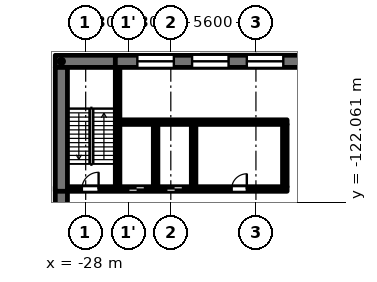
"""IFC4 building model, lengths in metres.
Left out: names, types, materials, properties, quantities, classifications, styles, units other than length and angle.
Written with IfcOpenShell. Run it as: python <this file> out.ifc"""

import sys

from ifc_helpers import new_model, si_unit, direction, frame, frame_2d, origin, place, context, subcontext, project, spatial, rectangle, extrude, element, fill, save


model = new_model("IFC4")
c1 = context("Model", 3, precision=1e-05, world=origin(), true_north=direction((0.0, 1.0)))
c2 = subcontext(c1, "Body", "Model", "MODEL_VIEW")
j1 = project(units=[si_unit("LENGTHUNIT", "METRE"), si_unit("PLANEANGLEUNIT", "RADIAN")], contexts=[c1])
p1 = place(None, origin())
s1 = spatial("IfcSite", under=j1, at=p1, CompositionType="ELEMENT")
p2 = place(p1, origin())
s2 = spatial("IfcBuilding", under=s1, at=p2, CompositionType="ELEMENT")
p3 = place(p2, frame((0.0, 0.0, 6.5)))
s3 = spatial("IfcBuildingStorey", under=s2, at=p3, CompositionType="ELEMENT", Elevation=6.5)
p4 = place(p3, frame((-29.2, -121.2, 0.0), z_axis=(0.0, 0.0, 1.0), x_axis=(1.0, 0.0, 0.0)))
e1 = element("IfcWall", 1, at=p4, inside=s3, PredefinedType="SOLIDWALL", context=c2, shape_type="SweptSolid", body=[
    extrude(rectangle(XDim=14.45, YDim=0.3, at=frame_2d((7.225, 0.0))), origin(), (0.0, 0.0, 1.0), 4.45),
])
p5 = place(p4, frame((4.0, 0.0, 0.0)))
e2 = element("IfcOpeningElement", 2, at=p5, cuts=e1, PredefinedType="OPENING", context=c2, shape_type="SweptSolid", body=[
    extrude(rectangle(XDim=1.1, YDim=2.1, at=frame_2d((0.55, 1.05))), frame((0.0, 0.16, 0.0), z_axis=(0.0, -1.0, 0.0), x_axis=(1.0, 0.0, 0.0)), (0.0, 0.0, 1.0), 0.32),
])
p6 = place(p4, frame((6.5, 0.0, 0.0)))
e3 = element("IfcOpeningElement", 3, at=p6, cuts=e1, PredefinedType="OPENING", context=c2, shape_type="SweptSolid", body=[
    extrude(rectangle(XDim=1.1, YDim=2.1, at=frame_2d((0.55, 1.05))), frame((0.0, 0.16, 0.0), z_axis=(0.0, -1.0, 0.0), x_axis=(1.0, 0.0, 0.0)), (0.0, 0.0, 1.0), 0.32),
])
p7 = place(p4, frame((0.95, 0.0, 0.0)))
e4 = element("IfcOpeningElement", 4, at=p7, cuts=e1, PredefinedType="OPENING", context=c2, shape_type="SweptSolid", body=[
    extrude(rectangle(XDim=1.1, YDim=2.1, at=frame_2d((0.55, 1.05))), frame((0.0, 0.16, 0.0), z_axis=(0.0, -1.0, 0.0), x_axis=(1.0, 0.0, 0.0)), (0.0, 0.0, 1.0), 0.32),
])
p8 = place(p4, frame((10.8, 0.0, 0.0)))
e5 = element("IfcOpeningElement", 5, at=p8, cuts=e1, PredefinedType="OPENING", context=c2, shape_type="SweptSolid", body=[
    extrude(rectangle(XDim=1.0, YDim=2.1, at=frame_2d((0.5, 1.05))), frame((0.0, 0.16, 0.0), z_axis=(0.0, -1.0, 0.0), x_axis=(1.0, 0.0, 0.0)), (0.0, 0.0, 1.0), 0.32),
])
p9 = place(p3, frame((-25.75, -116.8, 0.0), z_axis=(0.0, 0.0, 1.0), x_axis=(1.0, 0.0, 0.0)))
e6 = element("IfcWall", 6, at=p9, inside=s3, PredefinedType="SOLIDWALL", context=c2, shape_type="SweptSolid", body=[
    extrude(rectangle(XDim=11.0, YDim=0.3, at=frame_2d((5.5, 0.0))), origin(), (0.0, 0.0, 1.0), 4.45),
])
p10 = place(p3, frame((-30.0, -112.8, 0.0), z_axis=(0.0, 0.0, 1.0), x_axis=(1.0, 0.0, 0.0)))
e7 = element("IfcWall", 7, at=p10, inside=s3, PredefinedType="SOLIDWALL", context=c2, shape_type="SweptSolid", body=[
    extrude(rectangle(XDim=4.25, YDim=0.8, at=frame_2d((2.125, 0.0))), origin(), (0.0, 0.0, 1.0), 4.45),
])
p11 = place(p3, frame((-26.05, -112.8, 0.0), z_axis=(0.0, 0.0, 1.0), x_axis=(1.0, 0.0, 0.0)))
e8 = element("IfcWall", 8, at=p11, inside=s3, PredefinedType="SOLIDWALL", context=c2, shape_type="SweptSolid", body=[
    extrude(rectangle(XDim=52.1, YDim=0.8, at=frame_2d((26.05, 0.0))), origin(), (0.0, 0.0, 1.0), 4.45),
])
p12 = place(p11, frame((1.45, 0.0, 0.6)))
e9 = element("IfcOpeningElement", 9, at=p12, cuts=e8, PredefinedType="OPENING", context=c2, shape_type="SweptSolid", body=[
    extrude(rectangle(XDim=2.4, YDim=3.2, at=frame_2d((1.2, 1.6))), frame((0.0, 0.41, 0.0), z_axis=(0.0, -1.0, 0.0), x_axis=(1.0, 0.0, 0.0)), (0.0, 0.0, 1.0), 0.82),
])
p13 = place(p11, frame((5.05, 0.0, 0.6)))
e10 = element("IfcOpeningElement", 10, at=p13, cuts=e8, PredefinedType="OPENING", context=c2, shape_type="SweptSolid", body=[
    extrude(rectangle(XDim=2.4, YDim=3.2, at=frame_2d((1.2, 1.6))), frame((0.0, 0.41, 0.0), z_axis=(0.0, -1.0, 0.0), x_axis=(1.0, 0.0, 0.0)), (0.0, 0.0, 1.0), 0.82),
])
p14 = place(p11, frame((8.65, 0.0, 0.6)))
e11 = element("IfcOpeningElement", 11, at=p14, cuts=e8, PredefinedType="OPENING", context=c2, shape_type="SweptSolid", body=[
    extrude(rectangle(XDim=2.4, YDim=3.2, at=frame_2d((1.2, 1.6))), frame((0.0, 0.41, 0.0), z_axis=(0.0, -1.0, 0.0), x_axis=(1.0, 0.0, 0.0)), (0.0, 0.0, 1.0), 0.82),
])
p15 = place(p11, frame((12.25, 0.0, 0.6)))
e12 = element("IfcOpeningElement", 12, at=p15, cuts=e8, PredefinedType="OPENING", context=c2, shape_type="SweptSolid", body=[
    extrude(rectangle(XDim=2.4, YDim=3.2, at=frame_2d((1.2, 1.6))), frame((0.0, 0.41, 0.0), z_axis=(0.0, -1.0, 0.0), x_axis=(1.0, 0.0, 0.0)), (0.0, 0.0, 1.0), 0.82),
])
p16 = place(p11, frame((15.85, 0.0, 0.6)))
e13 = element("IfcOpeningElement", 13, at=p16, cuts=e8, PredefinedType="OPENING", context=c2, shape_type="SweptSolid", body=[
    extrude(rectangle(XDim=2.4, YDim=3.2, at=frame_2d((1.2, 1.6))), frame((0.0, 0.41, 0.0), z_axis=(0.0, -1.0, 0.0), x_axis=(1.0, 0.0, 0.0)), (0.0, 0.0, 1.0), 0.82),
])
p17 = place(p11, frame((19.45, 0.0, 0.6)))
e14 = element("IfcOpeningElement", 14, at=p17, cuts=e8, PredefinedType="OPENING", context=c2, shape_type="SweptSolid", body=[
    extrude(rectangle(XDim=2.4, YDim=3.2, at=frame_2d((1.2, 1.6))), frame((0.0, 0.41, 0.0), z_axis=(0.0, -1.0, 0.0), x_axis=(1.0, 0.0, 0.0)), (0.0, 0.0, 1.0), 0.82),
])
p18 = place(p11, frame((23.05, 0.0, 0.6)))
e15 = element("IfcOpeningElement", 15, at=p18, cuts=e8, PredefinedType="OPENING", context=c2, shape_type="SweptSolid", body=[
    extrude(rectangle(XDim=2.4, YDim=3.2, at=frame_2d((1.2, 1.6))), frame((0.0, 0.41, 0.0), z_axis=(0.0, -1.0, 0.0), x_axis=(1.0, 0.0, 0.0)), (0.0, 0.0, 1.0), 0.82),
])
p19 = place(p11, frame((26.65, 0.0, 0.6)))
e16 = element("IfcOpeningElement", 16, at=p19, cuts=e8, PredefinedType="OPENING", context=c2, shape_type="SweptSolid", body=[
    extrude(rectangle(XDim=2.4, YDim=3.2, at=frame_2d((1.2, 1.6))), frame((0.0, 0.41, 0.0), z_axis=(0.0, -1.0, 0.0), x_axis=(1.0, 0.0, 0.0)), (0.0, 0.0, 1.0), 0.82),
])
p20 = place(p11, frame((30.25, 0.0, 0.6)))
e17 = element("IfcOpeningElement", 17, at=p20, cuts=e8, PredefinedType="OPENING", context=c2, shape_type="SweptSolid", body=[
    extrude(rectangle(XDim=2.4, YDim=3.2, at=frame_2d((1.2, 1.6))), frame((0.0, 0.41, 0.0), z_axis=(0.0, -1.0, 0.0), x_axis=(1.0, 0.0, 0.0)), (0.0, 0.0, 1.0), 0.82),
])
p21 = place(p11, frame((33.85, 0.0, 0.6)))
e18 = element("IfcOpeningElement", 18, at=p21, cuts=e8, PredefinedType="OPENING", context=c2, shape_type="SweptSolid", body=[
    extrude(rectangle(XDim=2.4, YDim=3.2, at=frame_2d((1.2, 1.6))), frame((0.0, 0.41, 0.0), z_axis=(0.0, -1.0, 0.0), x_axis=(1.0, 0.0, 0.0)), (0.0, 0.0, 1.0), 0.82),
])
p22 = place(p11, frame((37.45, 0.0, 0.6)))
e19 = element("IfcOpeningElement", 19, at=p22, cuts=e8, PredefinedType="OPENING", context=c2, shape_type="SweptSolid", body=[
    extrude(rectangle(XDim=2.4, YDim=3.2, at=frame_2d((1.2, 1.6))), frame((0.0, 0.41, 0.0), z_axis=(0.0, -1.0, 0.0), x_axis=(1.0, 0.0, 0.0)), (0.0, 0.0, 1.0), 0.82),
])
p23 = place(p11, frame((41.05, 0.0, 0.6)))
e20 = element("IfcOpeningElement", 20, at=p23, cuts=e8, PredefinedType="OPENING", context=c2, shape_type="SweptSolid", body=[
    extrude(rectangle(XDim=2.4, YDim=3.2, at=frame_2d((1.2, 1.6))), frame((0.0, 0.41, 0.0), z_axis=(0.0, -1.0, 0.0), x_axis=(1.0, 0.0, 0.0)), (0.0, 0.0, 1.0), 0.82),
])
p24 = place(p11, frame((44.65, 0.0, 0.6)))
e21 = element("IfcOpeningElement", 21, at=p24, cuts=e8, PredefinedType="OPENING", context=c2, shape_type="SweptSolid", body=[
    extrude(rectangle(XDim=2.4, YDim=3.2, at=frame_2d((1.2, 1.6))), frame((0.0, 0.41, 0.0), z_axis=(0.0, -1.0, 0.0), x_axis=(1.0, 0.0, 0.0)), (0.0, 0.0, 1.0), 0.82),
])
p25 = place(p11, frame((48.25, 0.0, 0.6)))
e22 = element("IfcOpeningElement", 22, at=p25, cuts=e8, PredefinedType="OPENING", context=c2, shape_type="SweptSolid", body=[
    extrude(rectangle(XDim=2.4, YDim=3.2, at=frame_2d((1.2, 1.6))), frame((0.0, 0.41, 0.0), z_axis=(0.0, -1.0, 0.0), x_axis=(1.0, 0.0, 0.0)), (0.0, 0.0, 1.0), 0.82),
])
p26 = place(p3, frame((-29.6, -124.925, 0.0), z_axis=(0.0, 0.0, 1.0), x_axis=(0.0, 1.0, 0.0)))
e23 = element("IfcWall", 23, at=p26, inside=s3, PredefinedType="SOLIDWALL", context=c2, shape_type="SweptSolid", body=[
    extrude(rectangle(XDim=3.875, YDim=0.8, at=frame_2d((1.938, 0.0))), origin(), (0.0, 0.0, 1.0), 4.45),
])
p27 = place(p3, frame((-29.6, -121.35, 0.0), z_axis=(0.0, 0.0, 1.0), x_axis=(0.0, 1.0, 0.0)))
e24 = element("IfcWall", 24, at=p27, inside=s3, PredefinedType="SOLIDWALL", context=c2, shape_type="SweptSolid", body=[
    extrude(rectangle(XDim=8.15, YDim=0.8, at=frame_2d((4.075, 0.0))), origin(), (0.0, 0.0, 1.0), 4.45),
])
p28 = place(p3, frame((-25.9, -121.05, 0.0), z_axis=(0.0, 0.0, 1.0), x_axis=(0.0, 1.0, 0.0)))
e25 = element("IfcWall", 25, at=p28, inside=s3, PredefinedType="SOLIDWALL", context=c2, shape_type="SweptSolid", body=[
    extrude(rectangle(XDim=7.85, YDim=0.3, at=frame_2d((3.925, 0.0))), origin(), (0.0, 0.0, 1.0), 4.45),
])
for number, where, z_axis, x_axis in (
    (26, (-23.4, -121.05, 0.0), (0.0, 0.0, 1.0), (0.0, 1.0, 0.0)),
    (27, (-20.9, -121.05, 0.0), (0.0, 0.0, 1.0), (0.0, 1.0, 0.0)),
    (28, (-14.9, -121.05, 0.0), (0.0, 0.0, 1.0), (0.0, 1.0, 0.0)),
):
    element("IfcWall", number, at=place(p3, frame(where, z_axis=z_axis, x_axis=x_axis)), inside=s3, PredefinedType="SOLIDWALL", context=c2, shape_type="SweptSolid", body=[
        extrude(rectangle(XDim=4.1, YDim=0.3, at=frame_2d((2.05, 0.0))), origin(), (0.0, 0.0, 1.0), 4.45),
    ])
p29 = place(p12, origin())
e29 = element("IfcWindow", 29, at=p29, inside=s3, PartitioningType="SINGLE_PANEL", PredefinedType="WINDOW", context=c2, shape_type="SweptSolid", body=[
    extrude(rectangle(XDim=2.4, YDim=3.2, at=frame_2d((1.2, 1.6))), frame((0.0, 0.03, 0.0), z_axis=(0.0, -1.0, 0.0), x_axis=(1.0, 0.0, 0.0)), (0.0, 0.0, 1.0), 0.06),
])
fill(e9, e29)
p30 = place(p13, origin())
e30 = element("IfcWindow", 30, at=p30, inside=s3, PartitioningType="SINGLE_PANEL", PredefinedType="WINDOW", context=c2, shape_type="SweptSolid", body=[
    extrude(rectangle(XDim=2.4, YDim=3.2, at=frame_2d((1.2, 1.6))), frame((0.0, 0.03, 0.0), z_axis=(0.0, -1.0, 0.0), x_axis=(1.0, 0.0, 0.0)), (0.0, 0.0, 1.0), 0.06),
])
fill(e10, e30)
p31 = place(p14, origin())
e31 = element("IfcWindow", 31, at=p31, inside=s3, PartitioningType="SINGLE_PANEL", PredefinedType="WINDOW", context=c2, shape_type="SweptSolid", body=[
    extrude(rectangle(XDim=2.4, YDim=3.2, at=frame_2d((1.2, 1.6))), frame((0.0, 0.03, 0.0), z_axis=(0.0, -1.0, 0.0), x_axis=(1.0, 0.0, 0.0)), (0.0, 0.0, 1.0), 0.06),
])
fill(e11, e31)
p32 = place(p5, origin())
e32 = element("IfcDoor", 32, at=p32, inside=s3, OperationType="DOUBLE_DOOR_SLIDING", PredefinedType="DOOR", context=c2, shape_type="SweptSolid", body=[
    extrude(rectangle(XDim=1.1, YDim=2.1, at=frame_2d((0.55, 1.05))), frame((0.0, 0.025, 0.0), z_axis=(0.0, -1.0, 0.0), x_axis=(1.0, 0.0, 0.0)), (0.0, 0.0, 1.0), 0.05),
])
fill(e2, e32)
p33 = place(p6, origin())
e33 = element("IfcDoor", 33, at=p33, inside=s3, OperationType="DOUBLE_DOOR_SLIDING", PredefinedType="DOOR", context=c2, shape_type="SweptSolid", body=[
    extrude(rectangle(XDim=1.1, YDim=2.1, at=frame_2d((0.55, 1.05))), frame((0.0, 0.025, 0.0), z_axis=(0.0, -1.0, 0.0), x_axis=(1.0, 0.0, 0.0)), (0.0, 0.0, 1.0), 0.05),
])
fill(e3, e33)
p34 = place(p7, origin())
e34 = element("IfcDoor", 34, at=p34, inside=s3, OperationType="SINGLE_SWING_RIGHT", PredefinedType="DOOR", context=c2, shape_type="SweptSolid", body=[
    extrude(rectangle(XDim=1.1, YDim=2.1, at=frame_2d((0.55, 1.05))), frame((0.0, 0.025, 0.0), z_axis=(0.0, -1.0, 0.0), x_axis=(1.0, 0.0, 0.0)), (0.0, 0.0, 1.0), 0.05),
])
fill(e4, e34)
p35 = place(p8, origin())
e35 = element("IfcDoor", 35, at=p35, inside=s3, OperationType="SINGLE_SWING_RIGHT", PredefinedType="DOOR", context=c2, shape_type="SweptSolid", body=[
    extrude(rectangle(XDim=1.0, YDim=2.1, at=frame_2d((0.5, 1.05))), frame((0.0, 0.025, 0.0), z_axis=(0.0, -1.0, 0.0), x_axis=(1.0, 0.0, 0.0)), (0.0, 0.0, 1.0), 0.05),
])
fill(e5, e35)
save(model, sys.argv[1])
